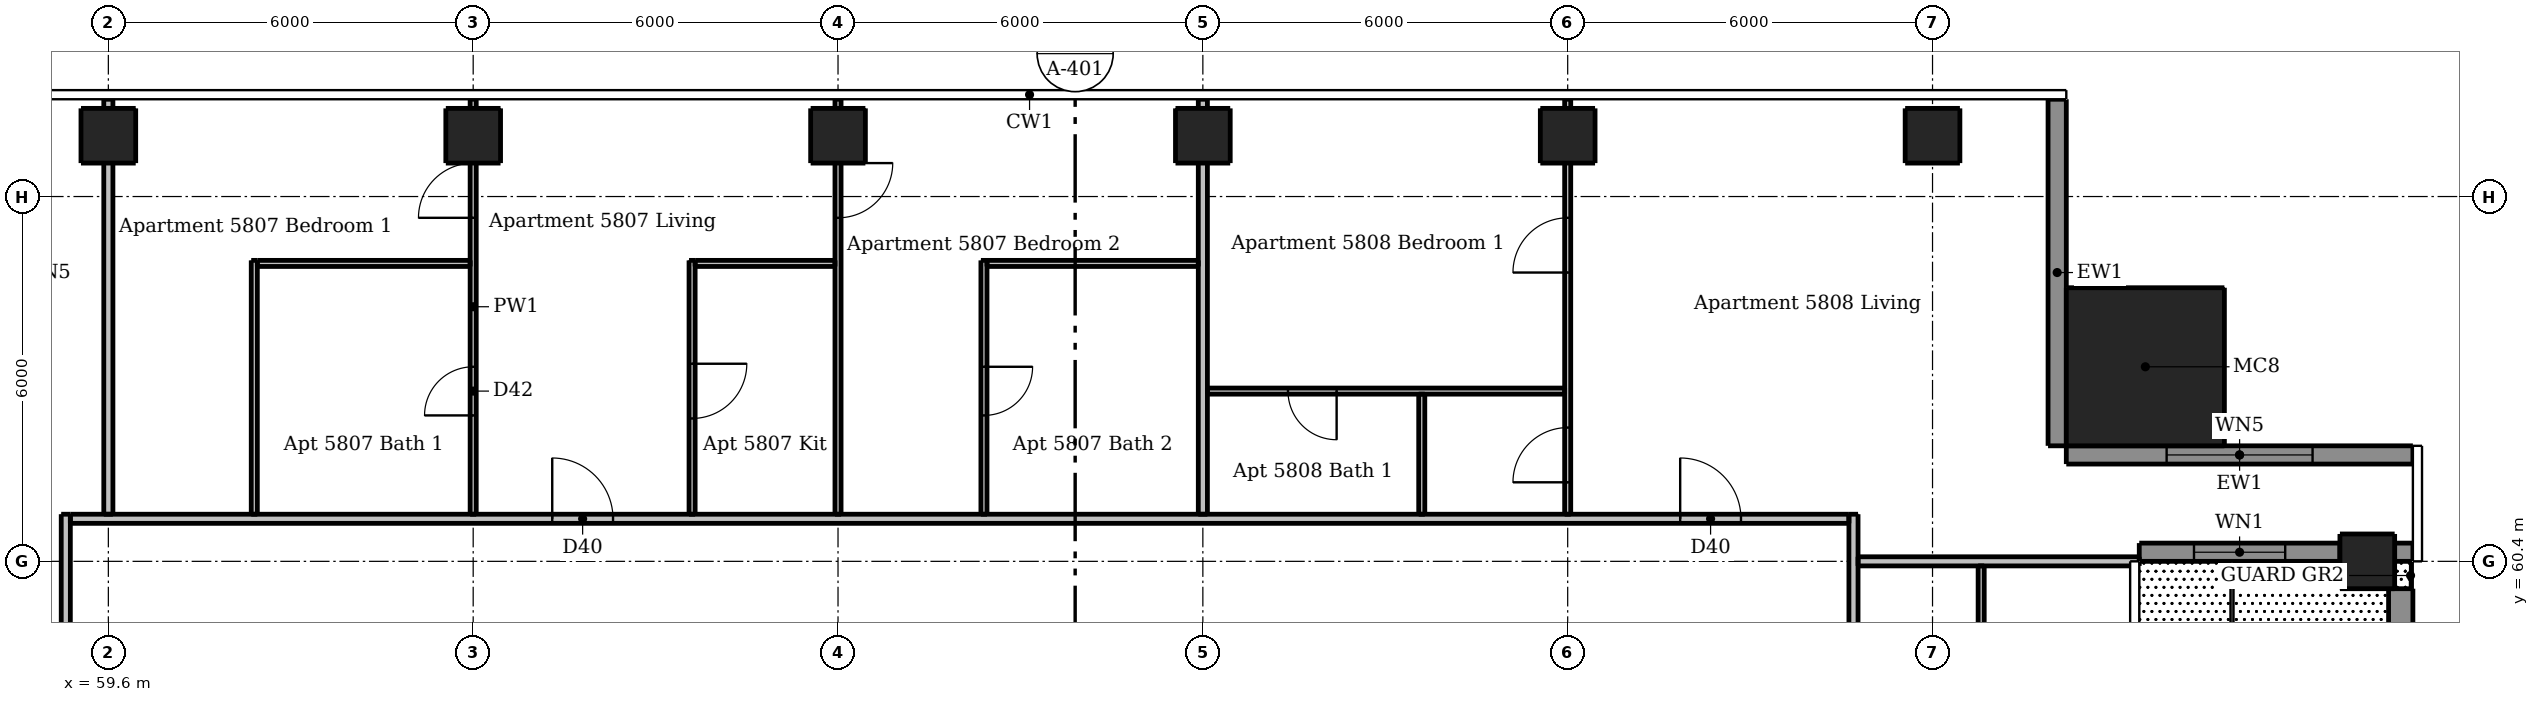
"""IFC4 building model, lengths in metres.
Left out: names, types, materials, properties, quantities, classifications, styles, units other than length and angle.
Written with IfcOpenShell. Run it as: python <this file> out.ifc"""

import sys

from ifc_helpers import new_model, si_unit, direction, frame, frame_2d, origin, origin_2d, place, context, subcontext, project, spatial, rectangle, extrude, element, fill, save


model = new_model("IFC4")
c1 = context("Model", 3, precision=1e-05, world=origin(), true_north=direction((0.0, 1.0)))
c2 = subcontext(c1, "Body", "Model", "MODEL_VIEW")
j1 = project(units=[si_unit("LENGTHUNIT", "METRE"), si_unit("PLANEANGLEUNIT", "RADIAN")], contexts=[c1])
p1 = place(None, origin())
s1 = spatial("IfcSite", under=j1, at=p1, CompositionType="ELEMENT")
p2 = place(p1, origin())
s2 = spatial("IfcBuilding", under=s1, at=p2, CompositionType="ELEMENT")
p3 = place(p2, frame((0.0, 0.0, 216.7)))
s3 = spatial("IfcBuildingStorey", under=s2, at=p3, CompositionType="ELEMENT", Elevation=216.7)
for number, where, z_axis, x_axis in (
    (1, (96.75, 60.4, 0.0), (0.0, 0.0, 1.0), (1.0, 0.0, 0.0)),
    (2, (59.6, 67.4, 0.0), (0.0, 0.0, 1.0), (1.0, 0.0, 0.0)),
    (3, (65.6, 67.4, 0.0), (0.0, 0.0, 1.0), (1.0, 0.0, 0.0)),
    (4, (71.6, 67.4, 0.0), (0.0, 0.0, 1.0), (1.0, 0.0, 0.0)),
    (5, (77.6, 67.4, 0.0), (0.0, 0.0, 1.0), (1.0, 0.0, 0.0)),
    (6, (83.6, 67.4, 0.0), (0.0, 0.0, 1.0), (1.0, 0.0, 0.0)),
    (7, (89.6, 67.4, 0.0), (0.0, 0.0, 1.0), (1.0, 0.0, 0.0)),
):
    element("IfcColumn", number, at=place(p3, frame(where, z_axis=z_axis, x_axis=x_axis)), inside=s3, PredefinedType="COLUMN", context=c2, shape_type="SweptSolid", body=[
        extrude(rectangle(XDim=0.9, YDim=0.9, at=origin_2d()), origin(), (0.0, 0.0, 1.0), 3.05),
    ])
p4 = place(p3, frame((93.1, 63.6, 0.0), z_axis=(0.0, 0.0, 1.0), x_axis=(1.0, 0.0, 0.0)))
e8 = element("IfcColumn", 8, at=p4, inside=s3, PredefinedType="COLUMN", context=c2, shape_type="SweptSolid", body=[
    extrude(rectangle(XDim=2.6, YDim=2.6, at=origin_2d()), origin(), (0.0, 0.0, 1.0), 3.3),
])
p5 = place(p3, frame((93.0, 60.55, 0.0), z_axis=(0.0, 0.0, 1.0), x_axis=(1.0, 0.0, 0.0)))
e9 = element("IfcWall", 9, at=p5, inside=s3, PredefinedType="SOLIDWALL", context=c2, shape_type="SweptSolid", body=[
    extrude(rectangle(XDim=3.3, YDim=0.3, at=frame_2d((1.65, 0.0))), origin(), (0.0, 0.0, 1.0), 3.05),
])
p6 = place(p5, frame((0.9, 0.0, 0.9)))
e10 = element("IfcOpeningElement", 10, at=p6, cuts=e9, PredefinedType="OPENING", context=c2, shape_type="SweptSolid", body=[
    extrude(rectangle(XDim=1.5, YDim=1.5, at=frame_2d((0.75, 0.75))), frame((0.0, 0.16, 0.0), z_axis=(0.0, -1.0, 0.0), x_axis=(1.0, 0.0, 0.0)), (0.0, 0.0, 1.0), 0.32),
])
p7 = place(p3, frame((97.2, 60.55, 0.0), z_axis=(0.0, 0.0, 1.0), x_axis=(1.0, 0.0, 0.0)))
e11 = element("IfcWall", 11, at=p7, inside=s3, PredefinedType="SOLIDWALL", context=c2, shape_type="SweptSolid", body=[
    extrude(rectangle(XDim=0.3, YDim=0.3, at=frame_2d((0.15, 0.0))), origin(), (0.0, 0.0, 1.0), 3.05),
])
p8 = place(p3, frame((97.5, 62.15, 0.0), z_axis=(0.0, 0.0, 1.0), x_axis=(-1.0, 0.0, 0.0)))
e12 = element("IfcWall", 12, at=p8, inside=s3, PredefinedType="SOLIDWALL", context=c2, shape_type="SweptSolid", body=[
    extrude(rectangle(XDim=5.7, YDim=0.3, at=frame_2d((2.85, 0.0))), origin(), (0.0, 0.0, 1.0), 3.05),
])
p9 = place(p8, frame((1.65, 0.0, 0.15)))
e13 = element("IfcOpeningElement", 13, at=p9, cuts=e12, PredefinedType="OPENING", context=c2, shape_type="SweptSolid", body=[
    extrude(rectangle(XDim=2.4, YDim=2.1, at=frame_2d((1.2, 1.05))), frame((0.0, 0.16, 0.0), z_axis=(0.0, -1.0, 0.0), x_axis=(1.0, 0.0, 0.0)), (0.0, 0.0, 1.0), 0.32),
])
p10 = place(p3, frame((91.65, 62.3, 0.0), z_axis=(0.0, 0.0, 1.0), x_axis=(0.0, 1.0, 0.0)))
e14 = element("IfcWall", 14, at=p10, inside=s3, PredefinedType="SOLIDWALL", context=c2, shape_type="SweptSolid", body=[
    extrude(rectangle(XDim=5.7, YDim=0.3, at=frame_2d((2.85, 0.0))), origin(), (0.0, 0.0, 1.0), 3.05),
])
p11 = place(p3, frame((97.3, 54.85, 0.03), z_axis=(0.0, 0.0, 1.0), x_axis=(0.0, 1.0, 0.0)))
e15 = element("IfcWall", 15, at=p11, inside=s3, PredefinedType="PARAPET", context=c2, shape_type="SweptSolid", body=[
    extrude(rectangle(XDim=5.1, YDim=0.4, at=frame_2d((2.55, 0.0))), origin(), (0.0, 0.0, 1.0), 1.1),
])
p12 = place(p3, frame((62.0, 61.175, 0.0), z_axis=(0.0, 0.0, 1.0), x_axis=(0.0, 1.0, 0.0)))
e16 = element("IfcWall", 16, at=p12, inside=s3, PredefinedType="PARTITIONING", context=c2, shape_type="SweptSolid", body=[
    extrude(rectangle(XDim=4.175, YDim=0.1, at=frame_2d((2.087, 0.0))), origin(), (0.0, 0.0, 1.0), 3.05),
])
p13 = place(p3, frame((65.6, 61.175, 0.0), z_axis=(0.0, 0.0, 1.0), x_axis=(0.0, 1.0, 0.0)))
e17 = element("IfcWall", 17, at=p13, inside=s3, PredefinedType="PARTITIONING", context=c2, shape_type="SweptSolid", body=[
    extrude(rectangle(XDim=6.825, YDim=0.1, at=frame_2d((3.413, 0.0))), origin(), (0.0, 0.0, 1.0), 2.516),
])
p14 = place(p13, frame((4.875, 0.0, 0.0)))
e18 = element("IfcOpeningElement", 18, at=p14, cuts=e17, PredefinedType="OPENING", context=c2, shape_type="SweptSolid", body=[
    extrude(rectangle(XDim=0.9, YDim=2.1, at=frame_2d((0.45, 1.05))), frame((0.0, 0.06, 0.0), z_axis=(0.0, -1.0, 0.0), x_axis=(1.0, 0.0, 0.0)), (0.0, 0.0, 1.0), 0.12),
])
p15 = place(p13, frame((1.625, 0.0, 0.0)))
e19 = element("IfcOpeningElement", 19, at=p15, cuts=e17, PredefinedType="OPENING", context=c2, shape_type="SweptSolid", body=[
    extrude(rectangle(XDim=0.8, YDim=2.1, at=frame_2d((0.4, 1.05))), frame((0.0, 0.06, 0.0), z_axis=(0.0, -1.0, 0.0), x_axis=(1.0, 0.0, 0.0)), (0.0, 0.0, 1.0), 0.12),
])
p16 = place(p3, frame((69.2, 65.35, 0.0), z_axis=(0.0, 0.0, 1.0), x_axis=(0.0, -1.0, 0.0)))
e20 = element("IfcWall", 20, at=p16, inside=s3, PredefinedType="PARTITIONING", context=c2, shape_type="SweptSolid", body=[
    extrude(rectangle(XDim=4.175, YDim=0.1, at=frame_2d((2.087, 0.0))), origin(), (0.0, 0.0, 1.0), 3.05),
])
p17 = place(p16, frame((1.7, 0.0, 0.0)))
e21 = element("IfcOpeningElement", 21, at=p17, cuts=e20, PredefinedType="OPENING", context=c2, shape_type="SweptSolid", body=[
    extrude(rectangle(XDim=0.9, YDim=2.1, at=frame_2d((0.45, 1.05))), frame((0.0, 0.06, 0.0), z_axis=(0.0, -1.0, 0.0), x_axis=(1.0, 0.0, 0.0)), (0.0, 0.0, 1.0), 0.12),
])
p18 = place(p3, frame((71.6, 68.0, 0.0), z_axis=(0.0, 0.0, 1.0), x_axis=(0.0, -1.0, 0.0)))
e22 = element("IfcWall", 22, at=p18, inside=s3, PredefinedType="PARTITIONING", context=c2, shape_type="SweptSolid", body=[
    extrude(rectangle(XDim=6.825, YDim=0.1, at=frame_2d((3.413, 0.0))), origin(), (0.0, 0.0, 1.0), 2.516),
])
p19 = place(p18, frame((1.05, 0.0, 0.0)))
e23 = element("IfcOpeningElement", 23, at=p19, cuts=e22, PredefinedType="OPENING", context=c2, shape_type="SweptSolid", body=[
    extrude(rectangle(XDim=0.9, YDim=2.1, at=frame_2d((0.45, 1.05))), frame((0.0, 0.06, 0.0), z_axis=(0.0, -1.0, 0.0), x_axis=(1.0, 0.0, 0.0)), (0.0, 0.0, 1.0), 0.12),
])
p20 = place(p3, frame((74.0, 65.35, 0.0), z_axis=(0.0, 0.0, 1.0), x_axis=(0.0, -1.0, 0.0)))
e24 = element("IfcWall", 24, at=p20, inside=s3, PredefinedType="PARTITIONING", context=c2, shape_type="SweptSolid", body=[
    extrude(rectangle(XDim=4.175, YDim=0.1, at=frame_2d((2.087, 0.0))), origin(), (0.0, 0.0, 1.0), 3.05),
])
p21 = place(p20, frame((1.75, 0.0, 0.0)))
e25 = element("IfcOpeningElement", 25, at=p21, cuts=e24, PredefinedType="OPENING", context=c2, shape_type="SweptSolid", body=[
    extrude(rectangle(XDim=0.8, YDim=2.1, at=frame_2d((0.4, 1.05))), frame((0.0, 0.06, 0.0), z_axis=(0.0, -1.0, 0.0), x_axis=(1.0, 0.0, 0.0)), (0.0, 0.0, 1.0), 0.12),
])
p22 = place(p3, frame((81.2, 61.175, 0.0), z_axis=(0.0, 0.0, 1.0), x_axis=(0.0, 1.0, 0.0)))
e26 = element("IfcWall", 26, at=p22, inside=s3, PredefinedType="PARTITIONING", context=c2, shape_type="SweptSolid", body=[
    extrude(rectangle(XDim=1.975, YDim=0.1, at=frame_2d((0.987, 0.0))), origin(), (0.0, 0.0, 1.0), 3.05),
])
p23 = place(p3, frame((83.6, 61.175, 0.0), z_axis=(0.0, 0.0, 1.0), x_axis=(0.0, 1.0, 0.0)))
e27 = element("IfcWall", 27, at=p23, inside=s3, PredefinedType="PARTITIONING", context=c2, shape_type="SweptSolid", body=[
    extrude(rectangle(XDim=6.825, YDim=0.1, at=frame_2d((3.413, 0.0))), origin(), (0.0, 0.0, 1.0), 2.516),
])
p24 = place(p23, frame((0.525, 0.0, 0.0)))
e28 = element("IfcOpeningElement", 28, at=p24, cuts=e27, PredefinedType="OPENING", context=c2, shape_type="SweptSolid", body=[
    extrude(rectangle(XDim=0.9, YDim=2.1, at=frame_2d((0.45, 1.05))), frame((0.0, 0.06, 0.0), z_axis=(0.0, -1.0, 0.0), x_axis=(1.0, 0.0, 0.0)), (0.0, 0.0, 1.0), 0.12),
])
p25 = place(p23, frame((3.975, 0.0, 0.0)))
e29 = element("IfcOpeningElement", 29, at=p25, cuts=e27, PredefinedType="OPENING", context=c2, shape_type="SweptSolid", body=[
    extrude(rectangle(XDim=0.9, YDim=2.1, at=frame_2d((0.45, 1.05))), frame((0.0, 0.06, 0.0), z_axis=(0.0, -1.0, 0.0), x_axis=(1.0, 0.0, 0.0)), (0.0, 0.0, 1.0), 0.12),
])
p26 = place(p3, frame((90.4, 57.45, 0.0), z_axis=(0.0, 0.0, 1.0), x_axis=(0.0, 1.0, 0.0)))
e30 = element("IfcWall", 30, at=p26, inside=s3, PredefinedType="PARTITIONING", context=c2, shape_type="SweptSolid", body=[
    extrude(rectangle(XDim=2.875, YDim=0.1, at=frame_2d((1.438, 0.0))), origin(), (0.0, 0.0, 1.0), 3.05),
])
p27 = place(p3, frame((62.05, 65.3, 0.0), z_axis=(0.0, 0.0, 1.0), x_axis=(1.0, 0.0, 0.0)))
e31 = element("IfcWall", 31, at=p27, inside=s3, PredefinedType="PARTITIONING", context=c2, shape_type="SweptSolid", body=[
    extrude(rectangle(XDim=3.5, YDim=0.1, at=frame_2d((1.75, 0.0))), origin(), (0.0, 0.0, 1.0), 3.05),
])
p28 = place(p3, frame((69.25, 65.3, 0.0), z_axis=(0.0, 0.0, 1.0), x_axis=(1.0, 0.0, 0.0)))
e32 = element("IfcWall", 32, at=p28, inside=s3, PredefinedType="PARTITIONING", context=c2, shape_type="SweptSolid", body=[
    extrude(rectangle(XDim=2.3, YDim=0.1, at=frame_2d((1.15, 0.0))), origin(), (0.0, 0.0, 1.0), 3.05),
])
p29 = place(p3, frame((74.05, 65.3, 0.0), z_axis=(0.0, 0.0, 1.0), x_axis=(1.0, 0.0, 0.0)))
e33 = element("IfcWall", 33, at=p29, inside=s3, PredefinedType="PARTITIONING", context=c2, shape_type="SweptSolid", body=[
    extrude(rectangle(XDim=3.475, YDim=0.1, at=frame_2d((1.737, 0.0))), origin(), (0.0, 0.0, 1.0), 3.05),
])
p30 = place(p3, frame((83.55, 63.2, 0.0), z_axis=(0.0, 0.0, 1.0), x_axis=(-1.0, 0.0, 0.0)))
e34 = element("IfcWall", 34, at=p30, inside=s3, PredefinedType="PARTITIONING", context=c2, shape_type="SweptSolid", body=[
    extrude(rectangle(XDim=5.875, YDim=0.1, at=frame_2d((2.938, 0.0))), origin(), (0.0, 0.0, 1.0), 3.05),
])
p31 = place(p30, frame((3.75, 0.0, 0.0)))
e35 = element("IfcOpeningElement", 35, at=p31, cuts=e34, PredefinedType="OPENING", context=c2, shape_type="SweptSolid", body=[
    extrude(rectangle(XDim=0.8, YDim=2.1, at=frame_2d((0.4, 1.05))), frame((0.0, 0.06, 0.0), z_axis=(0.0, -1.0, 0.0), x_axis=(1.0, 0.0, 0.0)), (0.0, 0.0, 1.0), 0.12),
])
p32 = place(p3, frame((58.9, 30.325, 0.0), z_axis=(0.0, 0.0, 1.0), x_axis=(0.0, 1.0, 0.0)))
e36 = element("IfcWall", 36, at=p32, inside=s3, PredefinedType="PARTITIONING", context=c2, shape_type="SweptSolid", body=[
    extrude(rectangle(XDim=30.85, YDim=0.15, at=frame_2d((15.425, 0.0))), origin(), (0.0, 0.0, 1.0), 3.05),
])
p33 = place(p32, frame((7.375, 0.0, 0.0)))
e37 = element("IfcOpeningElement", 37, at=p33, cuts=e36, PredefinedType="OPENING", context=c2, shape_type="SweptSolid", body=[
    extrude(rectangle(XDim=1.0, YDim=2.1, at=frame_2d((0.5, 1.05))), frame((0.0, 0.085, 0.0), z_axis=(0.0, -1.0, 0.0), x_axis=(1.0, 0.0, 0.0)), (0.0, 0.0, 1.0), 0.17),
])
p34 = place(p32, frame((26.925, 0.0, 0.0)))
e38 = element("IfcOpeningElement", 38, at=p34, cuts=e36, PredefinedType="OPENING", context=c2, shape_type="SweptSolid", body=[
    extrude(rectangle(XDim=1.0, YDim=2.1, at=frame_2d((0.5, 1.05))), frame((0.0, 0.085, 0.0), z_axis=(0.0, -1.0, 0.0), x_axis=(1.0, 0.0, 0.0)), (0.0, 0.0, 1.0), 0.17),
])
p35 = place(p3, frame((59.6, 61.175, 0.0), z_axis=(0.0, 0.0, 1.0), x_axis=(0.0, 1.0, 0.0)))
e39 = element("IfcWall", 39, at=p35, inside=s3, PredefinedType="PARTITIONING", context=c2, shape_type="SweptSolid", body=[
    extrude(rectangle(XDim=6.825, YDim=0.15, at=frame_2d((3.413, 0.0))), origin(), (0.0, 0.0, 1.0), 2.51),
])
p36 = place(p3, frame((77.6, 61.175, 0.0), z_axis=(0.0, 0.0, 1.0), x_axis=(0.0, 1.0, 0.0)))
e40 = element("IfcWall", 40, at=p36, inside=s3, PredefinedType="PARTITIONING", context=c2, shape_type="SweptSolid", body=[
    extrude(rectangle(XDim=6.825, YDim=0.15, at=frame_2d((3.413, 0.0))), origin(), (0.0, 0.0, 1.0), 2.516),
])
p37 = place(p3, frame((88.3, 61.175, 0.0), z_axis=(0.0, 0.0, 1.0), x_axis=(0.0, -1.0, 0.0)))
e41 = element("IfcWall", 41, at=p37, inside=s3, PredefinedType="PARTITIONING", context=c2, shape_type="SweptSolid", body=[
    extrude(rectangle(XDim=29.4, YDim=0.15, at=frame_2d((14.7, 0.0))), origin(), (0.0, 0.0, 1.0), 3.05),
])
p38 = place(p37, frame((28.125, 0.0, 0.0)))
e42 = element("IfcOpeningElement", 42, at=p38, cuts=e41, PredefinedType="OPENING", context=c2, shape_type="SweptSolid", body=[
    extrude(rectangle(XDim=1.0, YDim=2.1, at=frame_2d((0.5, 1.05))), frame((0.0, 0.085, 0.0), z_axis=(0.0, -1.0, 0.0), x_axis=(1.0, 0.0, 0.0)), (0.0, 0.0, 1.0), 0.17),
])
p39 = place(p37, frame((15.275, 0.0, 0.0)))
e43 = element("IfcOpeningElement", 43, at=p39, cuts=e41, PredefinedType="OPENING", context=c2, shape_type="SweptSolid", body=[
    extrude(rectangle(XDim=1.0, YDim=2.1, at=frame_2d((0.5, 1.05))), frame((0.0, 0.085, 0.0), z_axis=(0.0, -1.0, 0.0), x_axis=(1.0, 0.0, 0.0)), (0.0, 0.0, 1.0), 0.17),
])
p40 = place(p37, frame((5.075, 0.0, 0.0)))
e44 = element("IfcOpeningElement", 44, at=p40, cuts=e41, PredefinedType="OPENING", context=c2, shape_type="SweptSolid", body=[
    extrude(rectangle(XDim=1.0, YDim=2.1, at=frame_2d((0.5, 1.05))), frame((0.0, 0.085, 0.0), z_axis=(0.0, -1.0, 0.0), x_axis=(1.0, 0.0, 0.0)), (0.0, 0.0, 1.0), 0.17),
])
p41 = place(p3, frame((58.975, 61.1, 0.0), z_axis=(0.0, 0.0, 1.0), x_axis=(1.0, 0.0, 0.0)))
e45 = element("IfcWall", 45, at=p41, inside=s3, PredefinedType="PARTITIONING", context=c2, shape_type="SweptSolid", body=[
    extrude(rectangle(XDim=29.25, YDim=0.15, at=frame_2d((14.625, 0.0))), origin(), (0.0, 0.0, 1.0), 3.05),
])
p42 = place(p41, frame((7.925, 0.0, 0.0)))
e46 = element("IfcOpeningElement", 46, at=p42, cuts=e45, PredefinedType="OPENING", context=c2, shape_type="SweptSolid", body=[
    extrude(rectangle(XDim=1.0, YDim=2.1, at=frame_2d((0.5, 1.05))), frame((0.0, 0.085, 0.0), z_axis=(0.0, -1.0, 0.0), x_axis=(1.0, 0.0, 0.0)), (0.0, 0.0, 1.0), 0.17),
])
p43 = place(p41, frame((26.475, 0.0, 0.0)))
e47 = element("IfcOpeningElement", 47, at=p43, cuts=e45, PredefinedType="OPENING", context=c2, shape_type="SweptSolid", body=[
    extrude(rectangle(XDim=1.0, YDim=2.1, at=frame_2d((0.5, 1.05))), frame((0.0, 0.085, 0.0), z_axis=(0.0, -1.0, 0.0), x_axis=(1.0, 0.0, 0.0)), (0.0, 0.0, 1.0), 0.17),
])
p44 = place(p3, frame((88.375, 60.4, 0.0), z_axis=(0.0, 0.0, 1.0), x_axis=(1.0, 0.0, 0.0)))
e48 = element("IfcWall", 48, at=p44, inside=s3, PredefinedType="PARTITIONING", context=c2, shape_type="SweptSolid", body=[
    extrude(rectangle(XDim=4.625, YDim=0.15, at=frame_2d((2.312, 0.0))), origin(), (0.0, 0.0, 1.0), 2.59),
])
p45 = place(p6, origin())
e49 = element("IfcWindow", 49, at=p45, inside=s3, PartitioningType="DOUBLE_PANEL_VERTICAL", PredefinedType="WINDOW", context=c2, shape_type="SweptSolid", body=[
    extrude(rectangle(XDim=1.5, YDim=1.5, at=frame_2d((0.75, 0.75))), frame((0.0, 0.03, 0.0), z_axis=(0.0, -1.0, 0.0), x_axis=(1.0, 0.0, 0.0)), (0.0, 0.0, 1.0), 0.06),
])
fill(e10, e49)
p46 = place(p9, origin())
e50 = element("IfcWindow", 50, at=p46, inside=s3, PartitioningType="DOUBLE_PANEL_VERTICAL", PredefinedType="WINDOW", context=c2, shape_type="SweptSolid", body=[
    extrude(rectangle(XDim=2.4, YDim=2.1, at=frame_2d((1.2, 1.05))), frame((0.0, 0.03, 0.0), z_axis=(0.0, -1.0, 0.0), x_axis=(1.0, 0.0, 0.0)), (0.0, 0.0, 1.0), 0.06),
])
fill(e13, e50)
p47 = place(p42, origin())
e51 = element("IfcDoor", 51, at=p47, inside=s3, OperationType="SINGLE_SWING_LEFT", PredefinedType="DOOR", context=c2, shape_type="SweptSolid", body=[
    extrude(rectangle(XDim=1.0, YDim=2.1, at=frame_2d((0.5, 1.05))), frame((0.0, 0.025, 0.0), z_axis=(0.0, -1.0, 0.0), x_axis=(1.0, 0.0, 0.0)), (0.0, 0.0, 1.0), 0.05),
])
fill(e46, e51)
p48 = place(p17, origin())
e52 = element("IfcDoor", 52, at=p48, inside=s3, OperationType="SINGLE_SWING_LEFT", PredefinedType="DOOR", context=c2, shape_type="SweptSolid", body=[
    extrude(rectangle(XDim=0.9, YDim=2.1, at=frame_2d((0.45, 1.05))), frame((0.0, 0.025, 0.0), z_axis=(0.0, -1.0, 0.0), x_axis=(1.0, 0.0, 0.0)), (0.0, 0.0, 1.0), 0.05),
])
fill(e21, e52)
p49 = place(p14, origin())
e53 = element("IfcDoor", 53, at=p49, inside=s3, OperationType="SINGLE_SWING_LEFT", PredefinedType="DOOR", context=c2, shape_type="SweptSolid", body=[
    extrude(rectangle(XDim=0.9, YDim=2.1, at=frame_2d((0.45, 1.05))), frame((0.0, 0.025, 0.0), z_axis=(0.0, -1.0, 0.0), x_axis=(1.0, 0.0, 0.0)), (0.0, 0.0, 1.0), 0.05),
])
fill(e18, e53)
p50 = place(p15, origin())
e54 = element("IfcDoor", 54, at=p50, inside=s3, OperationType="SINGLE_SWING_LEFT", PredefinedType="DOOR", context=c2, shape_type="SweptSolid", body=[
    extrude(rectangle(XDim=0.8, YDim=2.1, at=frame_2d((0.4, 1.05))), frame((0.0, 0.025, 0.0), z_axis=(0.0, -1.0, 0.0), x_axis=(1.0, 0.0, 0.0)), (0.0, 0.0, 1.0), 0.05),
])
fill(e19, e54)
p51 = place(p19, origin())
e55 = element("IfcDoor", 55, at=p51, inside=s3, OperationType="SINGLE_SWING_LEFT", PredefinedType="DOOR", context=c2, shape_type="SweptSolid", body=[
    extrude(rectangle(XDim=0.9, YDim=2.1, at=frame_2d((0.45, 1.05))), frame((0.0, 0.025, 0.0), z_axis=(0.0, -1.0, 0.0), x_axis=(1.0, 0.0, 0.0)), (0.0, 0.0, 1.0), 0.05),
])
fill(e23, e55)
p52 = place(p21, origin())
e56 = element("IfcDoor", 56, at=p52, inside=s3, OperationType="SINGLE_SWING_LEFT", PredefinedType="DOOR", context=c2, shape_type="SweptSolid", body=[
    extrude(rectangle(XDim=0.8, YDim=2.1, at=frame_2d((0.4, 1.05))), frame((0.0, 0.025, 0.0), z_axis=(0.0, -1.0, 0.0), x_axis=(1.0, 0.0, 0.0)), (0.0, 0.0, 1.0), 0.05),
])
fill(e25, e56)
p53 = place(p43, origin())
e57 = element("IfcDoor", 57, at=p53, inside=s3, OperationType="SINGLE_SWING_LEFT", PredefinedType="DOOR", context=c2, shape_type="SweptSolid", body=[
    extrude(rectangle(XDim=1.0, YDim=2.1, at=frame_2d((0.5, 1.05))), frame((0.0, 0.025, 0.0), z_axis=(0.0, -1.0, 0.0), x_axis=(1.0, 0.0, 0.0)), (0.0, 0.0, 1.0), 0.05),
])
fill(e47, e57)
p54 = place(p24, origin())
e58 = element("IfcDoor", 58, at=p54, inside=s3, OperationType="SINGLE_SWING_LEFT", PredefinedType="DOOR", context=c2, shape_type="SweptSolid", body=[
    extrude(rectangle(XDim=0.9, YDim=2.1, at=frame_2d((0.45, 1.05))), frame((0.0, 0.025, 0.0), z_axis=(0.0, -1.0, 0.0), x_axis=(1.0, 0.0, 0.0)), (0.0, 0.0, 1.0), 0.05),
])
fill(e28, e58)
p55 = place(p25, origin())
e59 = element("IfcDoor", 59, at=p55, inside=s3, OperationType="SINGLE_SWING_LEFT", PredefinedType="DOOR", context=c2, shape_type="SweptSolid", body=[
    extrude(rectangle(XDim=0.9, YDim=2.1, at=frame_2d((0.45, 1.05))), frame((0.0, 0.025, 0.0), z_axis=(0.0, -1.0, 0.0), x_axis=(1.0, 0.0, 0.0)), (0.0, 0.0, 1.0), 0.05),
])
fill(e29, e59)
p56 = place(p31, origin())
e60 = element("IfcDoor", 60, at=p56, inside=s3, OperationType="SINGLE_SWING_LEFT", PredefinedType="DOOR", context=c2, shape_type="SweptSolid", body=[
    extrude(rectangle(XDim=0.8, YDim=2.1, at=frame_2d((0.4, 1.05))), frame((0.0, 0.025, 0.0), z_axis=(0.0, -1.0, 0.0), x_axis=(1.0, 0.0, 0.0)), (0.0, 0.0, 1.0), 0.05),
])
fill(e35, e60)
save(model, sys.argv[1])
